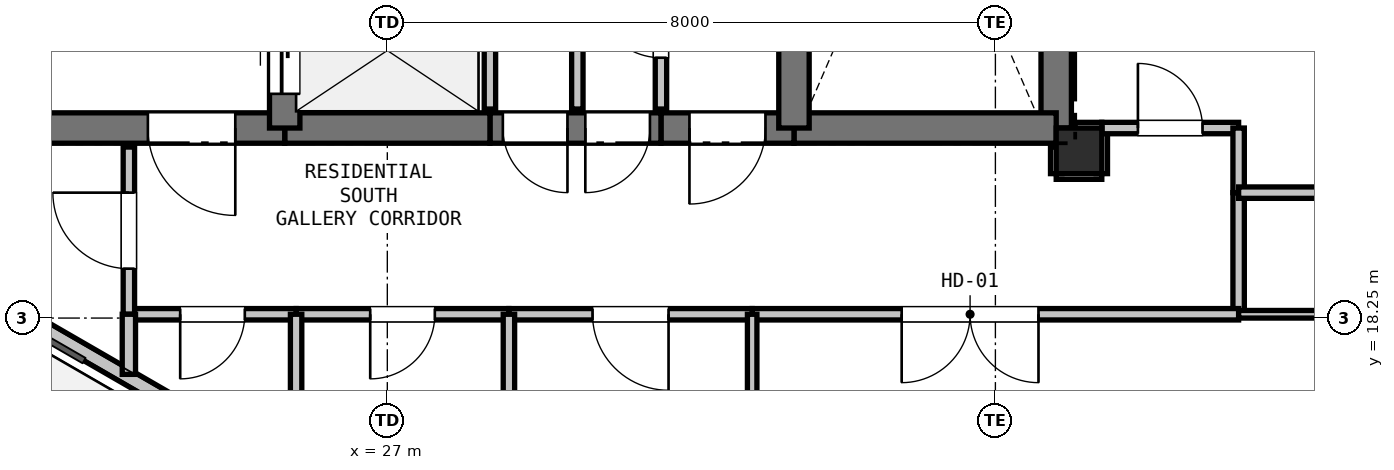
"""IFC4 building model, lengths in metres.
Left out: names, types, materials, properties, quantities, classifications, styles, units other than length and angle.
Written with IfcOpenShell. Run it as: python <this file> out.ifc"""

import sys

from ifc_helpers import new_model, si_unit, direction, frame, frame_2d, origin, origin_2d, place, context, subcontext, project, spatial, rectangle, extrude, element, fill, save


model = new_model("IFC4")
c1 = context("Model", 3, precision=1e-05, world=origin(), true_north=direction((0.0, 1.0)))
c2 = subcontext(c1, "Body", "Model", "MODEL_VIEW")
j1 = project(units=[si_unit("LENGTHUNIT", "METRE"), si_unit("PLANEANGLEUNIT", "RADIAN")], contexts=[c1])
p1 = place(None, origin())
s1 = spatial("IfcSite", under=j1, at=p1, CompositionType="ELEMENT")
p2 = place(p1, origin())
s2 = spatial("IfcBuilding", under=s1, at=p2, CompositionType="ELEMENT")
p3 = place(p2, frame((0.0, 0.0, 233.1)))
s3 = spatial("IfcBuildingStorey", under=s2, at=p3, CompositionType="ELEMENT", Elevation=233.1)
p4 = place(p3, frame((36.1, 20.45, 0.0), z_axis=(0.0, 0.0, 1.0), x_axis=(1.0, 0.0, 0.0)))
e1 = element("IfcColumn", 1, at=p4, inside=s3, PredefinedType="COLUMN", context=c2, shape_type="SweptSolid", body=[
    extrude(rectangle(XDim=0.6, YDim=0.6, at=origin_2d()), origin(), (0.0, 0.0, 1.0), 3.3),
])
p5 = place(p3, frame((27.191, 15.389, 0.0), z_axis=(0.0, 0.0, 1.0), x_axis=(-0.866019557082, 0.500010126649, 0.0)))
e2 = element("IfcWall", 2, at=p5, inside=s3, PredefinedType="PARAPET", context=c2, shape_type="SweptSolid", body=[
    extrude(rectangle(XDim=8.228, YDim=0.2, at=frame_2d((4.114, 0.0))), origin(), (0.0, 0.0, 1.0), 0.2),
])
p6 = place(p3, frame((35.8, 28.1, 0.0), z_axis=(0.0, 0.0, 1.0), x_axis=(0.0, -1.0, 0.0)))
e3 = element("IfcWall", 3, at=p6, inside=s3, PredefinedType="SHEAR", context=c2, shape_type="SweptSolid", body=[
    extrude(rectangle(XDim=7.35, YDim=0.4, at=frame_2d((3.675, 0.0))), origin(), (0.0, 0.0, 1.0), 3.08),
])
p7 = place(p3, frame((35.8, 20.75, 0.0), z_axis=(0.0, 0.0, 1.0), x_axis=(-1.0, 0.0, 0.0)))
e4 = element("IfcWall", 4, at=p7, inside=s3, PredefinedType="SHEAR", context=c2, shape_type="SweptSolid", body=[
    extrude(rectangle(XDim=3.45, YDim=0.4, at=frame_2d((1.725, 0.0))), origin(), (0.0, 0.0, 1.0), 3.08),
])
p8 = place(p3, frame((32.35, 20.75, 0.0), z_axis=(0.0, 0.0, 1.0), x_axis=(-1.0, 0.0, 0.0)))
e5 = element("IfcWall", 5, at=p8, inside=s3, PredefinedType="SHEAR", context=c2, shape_type="SweptSolid", body=[
    extrude(rectangle(XDim=1.75, YDim=0.4, at=frame_2d((0.875, 0.0))), origin(), (0.0, 0.0, 1.0), 3.08),
])
p9 = place(p8, frame((0.375, 0.0, 0.0)))
e6 = element("IfcOpeningElement", 6, at=p9, cuts=e5, PredefinedType="OPENING", context=c2, shape_type="SweptSolid", body=[
    extrude(rectangle(XDim=1.0, YDim=2.15, at=frame_2d((0.5, 1.075))), frame((0.0, 0.21, 0.0), z_axis=(0.0, -1.0, 0.0), x_axis=(1.0, 0.0, 0.0)), (0.0, 0.0, 1.0), 0.42),
])
p10 = place(p3, frame((30.6, 20.75, 0.0), z_axis=(0.0, 0.0, 1.0), x_axis=(-1.0, 0.0, 0.0)))
e7 = element("IfcWall", 7, at=p10, inside=s3, PredefinedType="SHEAR", context=c2, shape_type="SweptSolid", body=[
    extrude(rectangle(XDim=2.25, YDim=0.4, at=frame_2d((1.125, 0.0))), origin(), (0.0, 0.0, 1.0), 3.08),
])
p11 = place(p10, frame((1.23, 0.0, 0.0)))
e8 = element("IfcOpeningElement", 8, at=p11, cuts=e7, PredefinedType="OPENING", context=c2, shape_type="SweptSolid", body=[
    extrude(rectangle(XDim=0.85, YDim=2.1, at=frame_2d((0.425, 1.05))), frame((0.0, 0.21, 0.0), z_axis=(0.0, -1.0, 0.0), x_axis=(1.0, 0.0, 0.0)), (0.0, 0.0, 1.0), 0.42),
])
p12 = place(p10, frame((0.145, 0.0, 0.0)))
e9 = element("IfcOpeningElement", 9, at=p12, cuts=e7, PredefinedType="OPENING", context=c2, shape_type="SweptSolid", body=[
    extrude(rectangle(XDim=0.85, YDim=2.1, at=frame_2d((0.425, 1.05))), frame((0.0, 0.21, 0.0), z_axis=(0.0, -1.0, 0.0), x_axis=(1.0, 0.0, 0.0)), (0.0, 0.0, 1.0), 0.42),
])
p13 = place(p3, frame((28.35, 20.75, 0.0), z_axis=(0.0, 0.0, 1.0), x_axis=(-1.0, 0.0, 0.0)))
e10 = element("IfcWall", 10, at=p13, inside=s3, PredefinedType="SHEAR", context=c2, shape_type="SweptSolid", body=[
    extrude(rectangle(XDim=2.7, YDim=0.4, at=frame_2d((1.35, 0.0))), origin(), (0.0, 0.0, 1.0), 3.08),
])
p14 = place(p3, frame((25.65, 20.75, 0.0), z_axis=(0.0, 0.0, 1.0), x_axis=(-1.0, 0.0, 0.0)))
e11 = element("IfcWall", 11, at=p14, inside=s3, PredefinedType="SHEAR", context=c2, shape_type="SweptSolid", body=[
    extrude(rectangle(XDim=3.45, YDim=0.4, at=frame_2d((1.725, 0.0))), origin(), (0.0, 0.0, 1.0), 3.08),
])
p15 = place(p14, frame((0.65, 0.0, 0.0)))
e12 = element("IfcOpeningElement", 12, at=p15, cuts=e11, PredefinedType="OPENING", context=c2, shape_type="SweptSolid", body=[
    extrude(rectangle(XDim=1.15, YDim=2.15, at=frame_2d((0.575, 1.075))), frame((0.0, 0.21, 0.0), z_axis=(0.0, -1.0, 0.0), x_axis=(1.0, 0.0, 0.0)), (0.0, 0.0, 1.0), 0.42),
])
p16 = place(p3, frame((25.65, 20.75, 0.0), z_axis=(0.0, 0.0, 1.0), x_axis=(0.0, 1.0, 0.0)))
e13 = element("IfcWall", 13, at=p16, inside=s3, PredefinedType="SHEAR", context=c2, shape_type="SweptSolid", body=[
    extrude(rectangle(XDim=2.0, YDim=0.4, at=frame_2d((1.0, 0.0))), origin(), (0.0, 0.0, 1.0), 3.08),
])
p17 = place(p16, frame((0.45, 0.0, 0.0)))
e14 = element("IfcOpeningElement", 14, at=p17, cuts=e13, PredefinedType="OPENING", context=c2, shape_type="SweptSolid", body=[
    extrude(rectangle(XDim=1.1, YDim=2.15, at=frame_2d((0.55, 1.075))), frame((0.0, 0.21, 0.0), z_axis=(0.0, -1.0, 0.0), x_axis=(1.0, 0.0, 0.0)), (0.0, 0.0, 1.0), 0.42),
])
p18 = place(p3, frame((32.35, 20.75, 0.0), z_axis=(0.0, 0.0, 1.0), x_axis=(0.0, 1.0, 0.0)))
e15 = element("IfcWall", 15, at=p18, inside=s3, PredefinedType="SHEAR", context=c2, shape_type="SweptSolid", body=[
    extrude(rectangle(XDim=4.8, YDim=0.4, at=frame_2d((2.4, 0.0))), origin(), (0.0, 0.0, 1.0), 3.08),
])
p19 = place(p3, frame((28.35, 23.2, 0.0), z_axis=(0.0, 0.0, 1.0), x_axis=(0.0, -1.0, 0.0)))
e16 = element("IfcWall", 16, at=p19, inside=s3, PredefinedType="PARTITIONING", context=c2, shape_type="SweptSolid", body=[
    extrude(rectangle(XDim=2.2, YDim=0.15, at=frame_2d((1.1, 0.0))), origin(), (0.0, 0.0, 1.0), 3.08),
])
p20 = place(p3, frame((30.6, 21.0, 0.0), z_axis=(0.0, 0.0, 1.0), x_axis=(0.0, 1.0, 0.0)))
e17 = element("IfcWall", 17, at=p20, inside=s3, PredefinedType="PARTITIONING", context=c2, shape_type="SweptSolid", body=[
    extrude(rectangle(XDim=2.2, YDim=0.15, at=frame_2d((1.1, 0.0))), origin(), (0.0, 0.0, 1.0), 3.08),
])
p21 = place(p20, frame((0.675, 0.0, 0.0)))
e18 = element("IfcOpeningElement", 18, at=p21, cuts=e17, PredefinedType="OPENING", context=c2, shape_type="SweptSolid", body=[
    extrude(rectangle(XDim=0.85, YDim=2.1, at=frame_2d((0.425, 1.05))), frame((0.0, 0.085, 0.0), z_axis=(0.0, -1.0, 0.0), x_axis=(1.0, 0.0, 0.0)), (0.0, 0.0, 1.0), 0.17),
])
p22 = place(p3, frame((35.8, 20.15, 0.0), z_axis=(0.0, 0.0, 1.0), x_axis=(1.0, 0.0, 0.0)))
e19 = element("IfcWall", 19, at=p22, inside=s3, PredefinedType="PARTITIONING", context=c2, shape_type="SweptSolid", body=[
    extrude(rectangle(XDim=0.6, YDim=0.15, at=frame_2d((0.3, 0.0))), origin(), (0.0, 0.0, 1.0), 2.528),
])
p23 = place(p3, frame((36.4, 20.15, 0.0), z_axis=(0.0, 0.0, 1.0), x_axis=(0.0, 1.0, 0.0)))
e20 = element("IfcWall", 20, at=p23, inside=s3, PredefinedType="PARTITIONING", context=c2, shape_type="SweptSolid", body=[
    extrude(rectangle(XDim=0.6, YDim=0.15, at=frame_2d((0.3, 0.0))), origin(), (0.0, 0.0, 1.0), 3.08),
])
p24 = place(p3, frame((36.4, 20.75, 0.0), z_axis=(0.0, 0.0, 1.0), x_axis=(1.0, 0.0, 0.0)))
e21 = element("IfcWall", 21, at=p24, inside=s3, PredefinedType="PARTITIONING", context=c2, shape_type="SweptSolid", body=[
    extrude(rectangle(XDim=1.8, YDim=0.15, at=frame_2d((0.9, 0.0))), origin(), (0.0, 0.0, 1.0), 3.08),
])
p25 = place(p24, frame((0.475, 0.0, 0.0)))
e22 = element("IfcOpeningElement", 22, at=p25, cuts=e21, PredefinedType="OPENING", context=c2, shape_type="SweptSolid", body=[
    extrude(rectangle(XDim=0.85, YDim=2.1, at=frame_2d((0.425, 1.05))), frame((0.0, 0.085, 0.0), z_axis=(0.0, -1.0, 0.0), x_axis=(1.0, 0.0, 0.0)), (0.0, 0.0, 1.0), 0.17),
])
p26 = place(p3, frame((38.2, 20.75, 0.0), z_axis=(0.0, 0.0, 1.0), x_axis=(0.0, -1.0, 0.0)))
e23 = element("IfcWall", 23, at=p26, inside=s3, PredefinedType="PARTITIONING", context=c2, shape_type="SweptSolid", body=[
    extrude(rectangle(XDim=0.85, YDim=0.15, at=frame_2d((0.425, 0.0))), origin(), (0.0, 0.0, 1.0), 3.08),
])
p27 = place(p3, frame((38.2, 19.9, 0.0), z_axis=(0.0, 0.0, 1.0), x_axis=(0.0, -1.0, 0.0)))
e24 = element("IfcWall", 24, at=p27, inside=s3, PredefinedType="PARTITIONING", context=c2, shape_type="SweptSolid", body=[
    extrude(rectangle(XDim=1.6, YDim=0.15, at=frame_2d((0.8, 0.0))), origin(), (0.0, 0.0, 1.0), 3.08),
])
p28 = place(p3, frame((38.2, 18.3, 0.0), z_axis=(0.0, 0.0, 1.0), x_axis=(-1.0, 0.0, 0.0)))
e25 = element("IfcWall", 25, at=p28, inside=s3, PredefinedType="PARTITIONING", context=c2, shape_type="SweptSolid", body=[
    extrude(rectangle(XDim=6.4, YDim=0.15, at=frame_2d((3.2, 0.0))), origin(), (0.0, 0.0, 1.0), 2.528),
])
p29 = place(p28, frame((2.633, 0.0, 0.0)))
e26 = element("IfcOpeningElement", 26, at=p29, cuts=e25, PredefinedType="OPENING", context=c2, shape_type="SweptSolid", body=[
    extrude(rectangle(XDim=1.8, YDim=2.2, at=frame_2d((0.9, 1.1))), frame((0.0, 0.085, 0.0), z_axis=(0.0, -1.0, 0.0), x_axis=(1.0, 0.0, 0.0)), (0.0, 0.0, 1.0), 0.17),
])
p30 = place(p3, frame((31.8, 18.3, 0.0), z_axis=(0.0, 0.0, 1.0), x_axis=(-1.0, 0.0, 0.0)))
e27 = element("IfcWall", 27, at=p30, inside=s3, PredefinedType="PARTITIONING", context=c2, shape_type="SweptSolid", body=[
    extrude(rectangle(XDim=3.2, YDim=0.15, at=frame_2d((1.6, 0.0))), origin(), (0.0, 0.0, 1.0), 3.08),
])
p31 = place(p30, frame((1.1, 0.0, 0.0)))
e28 = element("IfcOpeningElement", 28, at=p31, cuts=e27, PredefinedType="OPENING", context=c2, shape_type="SweptSolid", body=[
    extrude(rectangle(XDim=1.0, YDim=2.15, at=frame_2d((0.5, 1.075))), frame((0.0, 0.085, 0.0), z_axis=(0.0, -1.0, 0.0), x_axis=(1.0, 0.0, 0.0)), (0.0, 0.0, 1.0), 0.17),
])
p32 = place(p3, frame((28.6, 18.3, 0.0), z_axis=(0.0, 0.0, 1.0), x_axis=(-1.0, 0.0, 0.0)))
e29 = element("IfcWall", 29, at=p32, inside=s3, PredefinedType="PARTITIONING", context=c2, shape_type="SweptSolid", body=[
    extrude(rectangle(XDim=2.8, YDim=0.15, at=frame_2d((1.4, 0.0))), origin(), (0.0, 0.0, 1.0), 3.08),
])
p33 = place(p32, frame((0.975, 0.0, 0.0)))
e30 = element("IfcOpeningElement", 30, at=p33, cuts=e29, PredefinedType="OPENING", context=c2, shape_type="SweptSolid", body=[
    extrude(rectangle(XDim=0.85, YDim=2.1, at=frame_2d((0.425, 1.05))), frame((0.0, 0.085, 0.0), z_axis=(0.0, -1.0, 0.0), x_axis=(1.0, 0.0, 0.0)), (0.0, 0.0, 1.0), 0.17),
])
p34 = place(p3, frame((25.8, 18.3, 0.0), z_axis=(0.0, 0.0, 1.0), x_axis=(-1.0, 0.0, 0.0)))
e31 = element("IfcWall", 31, at=p34, inside=s3, PredefinedType="PARTITIONING", context=c2, shape_type="SweptSolid", body=[
    extrude(rectangle(XDim=2.2, YDim=0.15, at=frame_2d((1.1, 0.0))), origin(), (0.0, 0.0, 1.0), 2.365),
])
p35 = place(p34, frame((0.675, 0.0, 0.0)))
e32 = element("IfcOpeningElement", 32, at=p35, cuts=e31, PredefinedType="OPENING", context=c2, shape_type="SweptSolid", body=[
    extrude(rectangle(XDim=0.85, YDim=2.1, at=frame_2d((0.425, 1.05))), frame((0.0, 0.085, 0.0), z_axis=(0.0, -1.0, 0.0), x_axis=(1.0, 0.0, 0.0)), (0.0, 0.0, 1.0), 0.17),
])
p36 = place(p3, frame((23.6, 18.3, 0.0), z_axis=(0.0, 0.0, 1.0), x_axis=(0.0, 1.0, 0.0)))
e33 = element("IfcWall", 33, at=p36, inside=s3, PredefinedType="PARTITIONING", context=c2, shape_type="SweptSolid", body=[
    extrude(rectangle(XDim=2.2, YDim=0.15, at=frame_2d((1.1, 0.0))), origin(), (0.0, 0.0, 1.0), 2.528),
])
p37 = place(p36, frame((0.6, 0.0, 0.0)))
e34 = element("IfcOpeningElement", 34, at=p37, cuts=e33, PredefinedType="OPENING", context=c2, shape_type="SweptSolid", body=[
    extrude(rectangle(XDim=1.0, YDim=2.15, at=frame_2d((0.5, 1.075))), frame((0.0, 0.085, 0.0), z_axis=(0.0, -1.0, 0.0), x_axis=(1.0, 0.0, 0.0)), (0.0, 0.0, 1.0), 0.17),
])
p38 = place(p3, frame((35.8, 20.5, 0.0), z_axis=(0.0, 0.0, 1.0), x_axis=(0.0, -1.0, 0.0)))
e35 = element("IfcWall", 35, at=p38, inside=s3, PredefinedType="PARTITIONING", context=c2, shape_type="SweptSolid", body=[
    extrude(rectangle(XDim=0.35, YDim=0.15, at=frame_2d((0.175, 0.0))), origin(), (0.0, 0.0, 1.0), 2.605),
])
p39 = place(p3, frame((25.8, 18.3, 0.0), z_axis=(0.0, 0.0, 1.0), x_axis=(0.0, -1.0, 0.0)))
e36 = element("IfcWall", 36, at=p39, inside=s3, PredefinedType="PARTITIONING", context=c2, shape_type="SweptSolid", body=[
    extrude(rectangle(XDim=2.061, YDim=0.15, at=frame_2d((1.031, 0.0))), origin(), (0.0, 0.0, 1.0), 2.365),
])
p40 = place(p3, frame((23.6, 17.509, 0.0), z_axis=(0.0, 0.0, 1.0), x_axis=(0.0, 1.0, 0.0)))
e37 = element("IfcWall", 37, at=p40, inside=s3, PredefinedType="PLUMBINGWALL", context=c2, shape_type="SweptSolid", body=[
    extrude(rectangle(XDim=0.791, YDim=0.175, at=frame_2d((0.396, 0.0))), origin(), (0.0, 0.0, 1.0), 2.365),
])
p41 = place(p3, frame((29.5, 23.2, 0.0), z_axis=(0.0, 0.0, 1.0), x_axis=(0.0, -1.0, 0.0)))
e38 = element("IfcWall", 38, at=p41, inside=s3, PredefinedType="PARTITIONING", context=c2, shape_type="SweptSolid", body=[
    extrude(rectangle(XDim=2.2, YDim=0.15, at=frame_2d((1.1, 0.0))), origin(), (0.0, 0.0, 1.0), 3.08),
])
p42 = place(p3, frame((31.8, 12.886, 0.0), z_axis=(0.0, 0.0, 1.0), x_axis=(0.0, 1.0, 0.0)))
e39 = element("IfcWall", 39, at=p42, inside=s3, PredefinedType="PARTITIONING", context=c2, shape_type="SweptSolid", body=[
    extrude(rectangle(XDim=5.414, YDim=0.125, at=frame_2d((2.707, 0.0))), origin(), (0.0, 0.0, 1.0), 2.365),
])
p43 = place(p3, frame((38.2, 18.3, 0.0), z_axis=(0.0, 0.0, 1.0), x_axis=(1.0, 0.0, 0.0)))
e40 = element("IfcWall", 40, at=p43, inside=s3, PredefinedType="PARTITIONING", context=c2, shape_type="SweptSolid", body=[
    extrude(rectangle(XDim=1.406, YDim=0.1, at=frame_2d((0.703, 0.0))), origin(), (0.0, 0.0, 1.0), 2.365),
])
p44 = place(p3, frame((36.4, 20.75, 0.0), z_axis=(0.0, 0.0, 1.0), x_axis=(-1.0, 0.0, 0.0)))
e41 = element("IfcWall", 41, at=p44, inside=s3, PredefinedType="PARTITIONING", context=c2, shape_type="SweptSolid", body=[
    extrude(rectangle(XDim=0.35, YDim=0.15, at=frame_2d((0.175, 0.0))), origin(), (0.0, 0.0, 1.0), 2.605),
])
p45 = place(p3, frame((39.606, 19.9, 0.0), z_axis=(0.0, 0.0, 1.0), x_axis=(-1.0, 0.0, 0.0)))
e42 = element("IfcWall", 42, at=p45, inside=s3, PredefinedType="PARTITIONING", context=c2, shape_type="SweptSolid", body=[
    extrude(rectangle(XDim=1.406, YDim=0.15, at=frame_2d((0.703, 0.0))), origin(), (0.0, 0.0, 1.0), 2.365),
])
p46 = place(p3, frame((28.6, 18.3, 0.0), z_axis=(0.0, 0.0, 1.0), x_axis=(0.0, -1.0, 0.0)))
e43 = element("IfcWall", 43, at=p46, inside=s3, PredefinedType="PARTITIONING", context=c2, shape_type="SweptSolid", body=[
    extrude(rectangle(XDim=2.3, YDim=0.15, at=frame_2d((1.15, 0.0))), origin(), (0.0, 0.0, 1.0), 3.08),
])
p47 = place(p9, origin())
e44 = element("IfcDoor", 44, at=p47, inside=s3, OperationType="SINGLE_SWING_RIGHT", PredefinedType="DOOR", context=c2, shape_type="SweptSolid", body=[
    extrude(rectangle(XDim=1.0, YDim=2.15, at=frame_2d((0.5, 1.075))), frame((0.0, 0.025, 0.0), z_axis=(0.0, -1.0, 0.0), x_axis=(1.0, 0.0, 0.0)), (0.0, 0.0, 1.0), 0.05),
])
fill(e6, e44)
p48 = place(p17, origin())
e45 = element("IfcDoor", 45, at=p48, inside=s3, OperationType="SLIDING_TO_LEFT", PredefinedType="DOOR", context=c2, shape_type="SweptSolid", body=[
    extrude(rectangle(XDim=1.1, YDim=2.15, at=frame_2d((0.55, 1.075))), frame((0.0, 0.025, 0.0), z_axis=(0.0, -1.0, 0.0), x_axis=(1.0, 0.0, 0.0)), (0.0, 0.0, 1.0), 0.05),
])
fill(e14, e45)
p49 = place(p15, origin())
e46 = element("IfcDoor", 46, at=p49, inside=s3, OperationType="SINGLE_SWING_LEFT", PredefinedType="DOOR", context=c2, shape_type="SweptSolid", body=[
    extrude(rectangle(XDim=1.15, YDim=2.15, at=frame_2d((0.575, 1.075))), frame((0.0, 0.025, 0.0), z_axis=(0.0, -1.0, 0.0), x_axis=(1.0, 0.0, 0.0)), (0.0, 0.0, 1.0), 0.05),
])
fill(e12, e46)
p50 = place(p21, origin())
e47 = element("IfcDoor", 47, at=p50, inside=s3, OperationType="SINGLE_SWING_RIGHT", PredefinedType="DOOR", context=c2, shape_type="SweptSolid", body=[
    extrude(rectangle(XDim=0.85, YDim=2.1, at=frame_2d((0.425, 1.05))), frame((0.0, 0.025, 0.0), z_axis=(0.0, -1.0, 0.0), x_axis=(1.0, 0.0, 0.0)), (0.0, 0.0, 1.0), 0.05),
])
fill(e18, e47)
p51 = place(p35, origin())
e48 = element("IfcDoor", 48, at=p51, inside=s3, OperationType="SINGLE_SWING_RIGHT", PredefinedType="DOOR", context=c2, shape_type="SweptSolid", body=[
    extrude(rectangle(XDim=0.85, YDim=2.1, at=frame_2d((0.425, 1.05))), frame((0.0, 0.025, 0.0), z_axis=(0.0, -1.0, 0.0), x_axis=(1.0, 0.0, 0.0)), (0.0, 0.0, 1.0), 0.05),
])
fill(e32, e48)
p52 = place(p11, origin())
e49 = element("IfcDoor", 49, at=p52, inside=s3, OperationType="SINGLE_SWING_LEFT", PredefinedType="DOOR", context=c2, shape_type="SweptSolid", body=[
    extrude(rectangle(XDim=0.85, YDim=2.1, at=frame_2d((0.425, 1.05))), frame((0.0, 0.025, 0.0), z_axis=(0.0, -1.0, 0.0), x_axis=(1.0, 0.0, 0.0)), (0.0, 0.0, 1.0), 0.05),
])
fill(e8, e49)
p53 = place(p12, origin())
e50 = element("IfcDoor", 50, at=p53, inside=s3, OperationType="SINGLE_SWING_RIGHT", PredefinedType="DOOR", context=c2, shape_type="SweptSolid", body=[
    extrude(rectangle(XDim=0.85, YDim=2.1, at=frame_2d((0.425, 1.05))), frame((0.0, 0.025, 0.0), z_axis=(0.0, -1.0, 0.0), x_axis=(1.0, 0.0, 0.0)), (0.0, 0.0, 1.0), 0.05),
])
fill(e9, e50)
p54 = place(p29, origin())
e51 = element("IfcDoor", 51, at=p54, inside=s3, OperationType="DOUBLE_DOOR_SINGLE_SWING", PredefinedType="DOOR", context=c2, shape_type="SweptSolid", body=[
    extrude(rectangle(XDim=1.8, YDim=2.2, at=frame_2d((0.9, 1.1))), frame((0.0, 0.025, 0.0), z_axis=(0.0, -1.0, 0.0), x_axis=(1.0, 0.0, 0.0)), (0.0, 0.0, 1.0), 0.05),
])
fill(e26, e51)
p55 = place(p37, origin())
e52 = element("IfcDoor", 52, at=p55, inside=s3, OperationType="SINGLE_SWING_RIGHT", PredefinedType="DOOR", context=c2, shape_type="SweptSolid", body=[
    extrude(rectangle(XDim=1.0, YDim=2.15, at=frame_2d((0.5, 1.075))), frame((0.0, 0.025, 0.0), z_axis=(0.0, -1.0, 0.0), x_axis=(1.0, 0.0, 0.0)), (0.0, 0.0, 1.0), 0.05),
])
fill(e34, e52)
p56 = place(p25, origin())
e53 = element("IfcDoor", 53, at=p56, inside=s3, OperationType="SINGLE_SWING_LEFT", PredefinedType="DOOR", context=c2, shape_type="SweptSolid", body=[
    extrude(rectangle(XDim=0.85, YDim=2.1, at=frame_2d((0.425, 1.05))), frame((0.0, 0.025, 0.0), z_axis=(0.0, -1.0, 0.0), x_axis=(1.0, 0.0, 0.0)), (0.0, 0.0, 1.0), 0.05),
])
fill(e22, e53)
p57 = place(p33, origin())
e54 = element("IfcDoor", 54, at=p57, inside=s3, OperationType="SINGLE_SWING_RIGHT", PredefinedType="DOOR", context=c2, shape_type="SweptSolid", body=[
    extrude(rectangle(XDim=0.85, YDim=2.1, at=frame_2d((0.425, 1.05))), frame((0.0, 0.025, 0.0), z_axis=(0.0, -1.0, 0.0), x_axis=(1.0, 0.0, 0.0)), (0.0, 0.0, 1.0), 0.05),
])
fill(e30, e54)
p58 = place(p31, origin())
e55 = element("IfcDoor", 55, at=p58, inside=s3, OperationType="SINGLE_SWING_LEFT", PredefinedType="DOOR", context=c2, shape_type="SweptSolid", body=[
    extrude(rectangle(XDim=1.0, YDim=2.15, at=frame_2d((0.5, 1.075))), frame((0.0, 0.025, 0.0), z_axis=(0.0, -1.0, 0.0), x_axis=(1.0, 0.0, 0.0)), (0.0, 0.0, 1.0), 0.05),
])
fill(e28, e55)
save(model, sys.argv[1])
